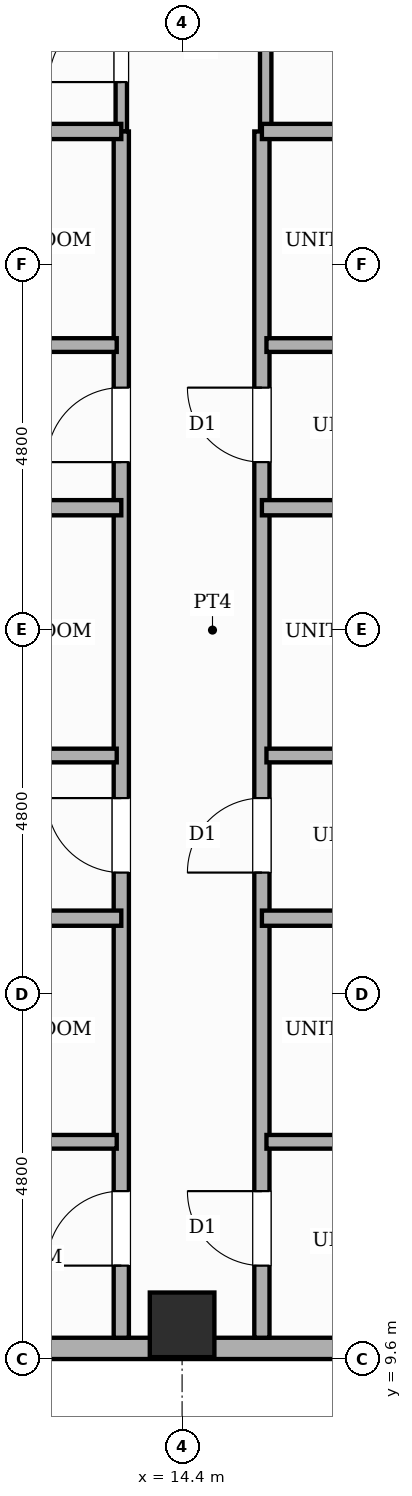
"""IFC4 building model, lengths in metres.
Left out: names, types, materials, properties, quantities, classifications, styles, units other than length and angle.
Written with IfcOpenShell. Run it as: python <this file> out.ifc"""

import sys

from ifc_helpers import new_model, si_unit, direction, frame, frame_2d, origin, origin_2d, place, context, subcontext, project, spatial, rectangle, extrude, element, fill, save


model = new_model("IFC4")
c1 = context("Model", 3, precision=1e-05, world=origin(), true_north=direction((0.0, 1.0)))
c2 = subcontext(c1, "Body", "Model", "MODEL_VIEW")
j1 = project(units=[si_unit("LENGTHUNIT", "METRE"), si_unit("PLANEANGLEUNIT", "RADIAN")], contexts=[c1])
p1 = place(None, origin())
s1 = spatial("IfcSite", under=j1, at=p1, CompositionType="ELEMENT")
p2 = place(p1, origin())
s2 = spatial("IfcBuilding", under=s1, at=p2, CompositionType="ELEMENT")
p3 = place(p2, frame((0.0, 0.0, 211.0)))
s3 = spatial("IfcBuildingStorey", under=s2, at=p3, CompositionType="ELEMENT", Elevation=211.0)
p4 = place(p3, frame((14.4, 10.05, 0.0), z_axis=(0.0, 0.0, 1.0), x_axis=(1.0, 0.0, 0.0)))
e1 = element("IfcColumn", 1, at=p4, inside=s3, PredefinedType="COLUMN", context=c2, shape_type="SweptSolid", body=[
    extrude(rectangle(XDim=0.85, YDim=0.85, at=origin_2d()), origin(), (0.0, 0.0, 1.0), 3.6),
])
p5 = place(p3, frame((21.6, 9.74, 0.0), z_axis=(0.0, 0.0, 1.0), x_axis=(-1.0, 0.0, 0.0)))
e2 = element("IfcWall", 2, at=p5, inside=s3, PredefinedType="STANDARD", context=c2, shape_type="SweptSolid", body=[
    extrude(rectangle(XDim=14.4, YDim=0.28, at=frame_2d((7.2, 0.0))), origin(), (0.0, 0.0, 1.0), 2.66),
])
p6 = place(p5, frame((9.077, 0.0, 0.65)))
e3 = element("IfcOpeningElement", 3, at=p6, cuts=e2, PredefinedType="OPENING", context=c2, shape_type="SweptSolid", body=[
    extrude(rectangle(XDim=1.4, YDim=1.1, at=frame_2d((0.7, 0.55))), frame((0.0, 0.15, 0.0), z_axis=(0.0, -1.0, 0.0), x_axis=(1.0, 0.0, 0.0)), (0.0, 0.0, 1.0), 0.3),
])
p7 = place(p5, frame((0.308, 0.0, 0.65)))
e4 = element("IfcOpeningElement", 4, at=p7, cuts=e2, PredefinedType="OPENING", context=c2, shape_type="SweptSolid", body=[
    extrude(rectangle(XDim=1.4, YDim=1.1, at=frame_2d((0.7, 0.55))), frame((0.0, 0.15, 0.0), z_axis=(0.0, -1.0, 0.0), x_axis=(1.0, 0.0, 0.0)), (0.0, 0.0, 1.0), 0.3),
])
p8 = place(p3, frame((13.6, 25.75, 0.0), z_axis=(0.0, 0.0, 1.0), x_axis=(0.0, 1.0, 0.0)))
e5 = element("IfcWall", 5, at=p8, inside=s3, PredefinedType="PARTITIONING", context=c2, shape_type="SweptSolid", body=[
    extrude(rectangle(XDim=5.15, YDim=0.15, at=frame_2d((2.575, 0.0))), origin(), (0.0, 0.0, 1.0), 3.38),
])
p9 = place(p8, frame((0.65, 0.0, 0.0)))
e6 = element("IfcOpeningElement", 6, at=p9, cuts=e5, PredefinedType="OPENING", context=c2, shape_type="SweptSolid", body=[
    extrude(rectangle(XDim=0.95, YDim=2.15, at=frame_2d((0.475, 1.075))), frame((0.0, 0.085, 0.0), z_axis=(0.0, -1.0, 0.0), x_axis=(1.0, 0.0, 0.0)), (0.0, 0.0, 1.0), 0.17),
])
p10 = place(p8, frame((3.1, 0.0, 0.0)))
e7 = element("IfcOpeningElement", 7, at=p10, cuts=e5, PredefinedType="OPENING", context=c2, shape_type="SweptSolid", body=[
    extrude(rectangle(XDim=0.95, YDim=2.15, at=frame_2d((0.475, 1.075))), frame((0.0, 0.085, 0.0), z_axis=(0.0, -1.0, 0.0), x_axis=(1.0, 0.0, 0.0)), (0.0, 0.0, 1.0), 0.17),
])
p11 = place(p3, frame((15.5, 25.75, 0.0), z_axis=(0.0, 0.0, 1.0), x_axis=(0.0, 1.0, 0.0)))
e8 = element("IfcWall", 8, at=p11, inside=s3, PredefinedType="PARTITIONING", context=c2, shape_type="SweptSolid", body=[
    extrude(rectangle(XDim=5.15, YDim=0.15, at=frame_2d((2.575, 0.0))), origin(), (0.0, 0.0, 1.0), 3.38),
])
p12 = place(p11, frame((1.1, 0.0, 0.0)))
e9 = element("IfcOpeningElement", 9, at=p12, cuts=e8, PredefinedType="OPENING", context=c2, shape_type="SweptSolid", body=[
    extrude(rectangle(XDim=0.95, YDim=2.15, at=frame_2d((0.475, 1.075))), frame((0.0, 0.085, 0.0), z_axis=(0.0, -1.0, 0.0), x_axis=(1.0, 0.0, 0.0)), (0.0, 0.0, 1.0), 0.17),
])
p13 = place(p3, frame((13.6, 9.88, 0.0), z_axis=(0.0, 0.0, 1.0), x_axis=(0.0, 1.0, 0.0)))
e10 = element("IfcWall", 10, at=p13, inside=s3, PredefinedType="PARTITIONING", context=c2, shape_type="SweptSolid", body=[
    extrude(rectangle(XDim=15.87, YDim=0.2, at=frame_2d((7.935, 0.0))), origin(), (0.0, 0.0, 1.0), 3.38),
])
p14 = place(p13, frame((0.949, 0.0, 0.0)))
e11 = element("IfcOpeningElement", 11, at=p14, cuts=e10, PredefinedType="OPENING", context=c2, shape_type="SweptSolid", body=[
    extrude(rectangle(XDim=0.98, YDim=2.18, at=frame_2d((0.49, 1.09))), frame((0.0, 0.11, 0.0), z_axis=(0.0, -1.0, 0.0), x_axis=(1.0, 0.0, 0.0)), (0.0, 0.0, 1.0), 0.22),
])
p15 = place(p13, frame((6.12, 0.0, 0.0)))
e12 = element("IfcOpeningElement", 12, at=p15, cuts=e10, PredefinedType="OPENING", context=c2, shape_type="SweptSolid", body=[
    extrude(rectangle(XDim=0.98, YDim=2.18, at=frame_2d((0.49, 1.09))), frame((0.0, 0.11, 0.0), z_axis=(0.0, -1.0, 0.0), x_axis=(1.0, 0.0, 0.0)), (0.0, 0.0, 1.0), 0.22),
])
p16 = place(p13, frame((11.52, 0.0, 0.0)))
e13 = element("IfcOpeningElement", 13, at=p16, cuts=e10, PredefinedType="OPENING", context=c2, shape_type="SweptSolid", body=[
    extrude(rectangle(XDim=0.98, YDim=2.18, at=frame_2d((0.49, 1.09))), frame((0.0, 0.11, 0.0), z_axis=(0.0, -1.0, 0.0), x_axis=(1.0, 0.0, 0.0)), (0.0, 0.0, 1.0), 0.22),
])
p17 = place(p3, frame((15.45, 9.88, 0.0), z_axis=(0.0, 0.0, 1.0), x_axis=(0.0, 1.0, 0.0)))
e14 = element("IfcWall", 14, at=p17, inside=s3, PredefinedType="PARTITIONING", context=c2, shape_type="SweptSolid", body=[
    extrude(rectangle(XDim=15.87, YDim=0.2, at=frame_2d((7.935, 0.0))), origin(), (0.0, 0.0, 1.0), 3.38),
])
p18 = place(p17, frame((0.949, 0.0, 0.0)))
e15 = element("IfcOpeningElement", 15, at=p18, cuts=e14, PredefinedType="OPENING", context=c2, shape_type="SweptSolid", body=[
    extrude(rectangle(XDim=0.98, YDim=2.18, at=frame_2d((0.49, 1.09))), frame((0.0, 0.11, 0.0), z_axis=(0.0, -1.0, 0.0), x_axis=(1.0, 0.0, 0.0)), (0.0, 0.0, 1.0), 0.22),
])
p19 = place(p17, frame((6.12, 0.0, 0.0)))
e16 = element("IfcOpeningElement", 16, at=p19, cuts=e14, PredefinedType="OPENING", context=c2, shape_type="SweptSolid", body=[
    extrude(rectangle(XDim=0.98, YDim=2.18, at=frame_2d((0.49, 1.09))), frame((0.0, 0.11, 0.0), z_axis=(0.0, -1.0, 0.0), x_axis=(1.0, 0.0, 0.0)), (0.0, 0.0, 1.0), 0.22),
])
p20 = place(p17, frame((11.52, 0.0, 0.0)))
e17 = element("IfcOpeningElement", 17, at=p20, cuts=e14, PredefinedType="OPENING", context=c2, shape_type="SweptSolid", body=[
    extrude(rectangle(XDim=0.98, YDim=2.18, at=frame_2d((0.49, 1.09))), frame((0.0, 0.11, 0.0), z_axis=(0.0, -1.0, 0.0), x_axis=(1.0, 0.0, 0.0)), (0.0, 0.0, 1.0), 0.22),
])
p21 = place(p3, frame((5.08, 25.75, 0.0), z_axis=(0.0, 0.0, 1.0), x_axis=(1.0, 0.0, 0.0)))
e18 = element("IfcWall", 18, at=p21, inside=s3, PredefinedType="PARTITIONING", context=c2, shape_type="SweptSolid", body=[
    extrude(rectangle(XDim=8.52, YDim=0.2, at=frame_2d((4.26, 0.0))), origin(), (0.0, 0.0, 1.0), 3.38),
])
p22 = place(p3, frame((15.45, 25.75, 0.0), z_axis=(0.0, 0.0, 1.0), x_axis=(1.0, 0.0, 0.0)))
e19 = element("IfcWall", 19, at=p22, inside=s3, PredefinedType="PARTITIONING", context=c2, shape_type="SweptSolid", body=[
    extrude(rectangle(XDim=8.27, YDim=0.2, at=frame_2d((4.135, 0.0))), origin(), (0.0, 0.0, 1.0), 3.38),
])
p23 = place(p3, frame((5.08, 12.458, 0.0), z_axis=(0.0, 0.0, 1.0), x_axis=(1.0, 0.0, 0.0)))
e20 = element("IfcWall", 20, at=p23, inside=s3, PredefinedType="PLUMBINGWALL", context=c2, shape_type="SweptSolid", body=[
    extrude(rectangle(XDim=8.46, YDim=0.18, at=frame_2d((4.23, 0.0))), origin(), (0.0, 0.0, 1.0), 3.38),
])
p24 = place(p23, frame((1.56, 0.0, 0.0)))
e21 = element("IfcOpeningElement", 21, at=p24, cuts=e20, PredefinedType="OPENING", context=c2, shape_type="SweptSolid", body=[
    extrude(rectangle(XDim=0.86, YDim=2.1, at=frame_2d((0.43, 1.05))), frame((0.0, 0.1, 0.0), z_axis=(0.0, -1.0, 0.0), x_axis=(1.0, 0.0, 0.0)), (0.0, 0.0, 1.0), 0.2),
])
p25 = place(p23, frame((5.85, 0.0, 0.0)))
e22 = element("IfcOpeningElement", 22, at=p25, cuts=e20, PredefinedType="OPENING", context=c2, shape_type="SweptSolid", body=[
    extrude(rectangle(XDim=0.86, YDim=2.1, at=frame_2d((0.43, 1.05))), frame((0.0, 0.1, 0.0), z_axis=(0.0, -1.0, 0.0), x_axis=(1.0, 0.0, 0.0)), (0.0, 0.0, 1.0), 0.2),
])
p26 = place(p3, frame((5.08, 15.4, 0.0), z_axis=(0.0, 0.0, 1.0), x_axis=(1.0, 0.0, 0.0)))
e23 = element("IfcWall", 23, at=p26, inside=s3, PredefinedType="SOLIDWALL", context=c2, shape_type="SweptSolid", body=[
    extrude(rectangle(XDim=8.52, YDim=0.2, at=frame_2d((4.26, 0.0))), origin(), (0.0, 0.0, 1.0), 3.38),
])
p27 = place(p3, frame((5.08, 17.54, 0.0), z_axis=(0.0, 0.0, 1.0), x_axis=(1.0, 0.0, 0.0)))
e24 = element("IfcWall", 24, at=p27, inside=s3, PredefinedType="PLUMBINGWALL", context=c2, shape_type="SweptSolid", body=[
    extrude(rectangle(XDim=8.46, YDim=0.18, at=frame_2d((4.23, 0.0))), origin(), (0.0, 0.0, 1.0), 3.38),
])
p28 = place(p27, frame((1.56, 0.0, 0.0)))
e25 = element("IfcOpeningElement", 25, at=p28, cuts=e24, PredefinedType="OPENING", context=c2, shape_type="SweptSolid", body=[
    extrude(rectangle(XDim=0.86, YDim=2.1, at=frame_2d((0.43, 1.05))), frame((0.0, 0.1, 0.0), z_axis=(0.0, -1.0, 0.0), x_axis=(1.0, 0.0, 0.0)), (0.0, 0.0, 1.0), 0.2),
])
p29 = place(p27, frame((5.85, 0.0, 0.0)))
e26 = element("IfcOpeningElement", 26, at=p29, cuts=e24, PredefinedType="OPENING", context=c2, shape_type="SweptSolid", body=[
    extrude(rectangle(XDim=0.86, YDim=2.1, at=frame_2d((0.43, 1.05))), frame((0.0, 0.1, 0.0), z_axis=(0.0, -1.0, 0.0), x_axis=(1.0, 0.0, 0.0)), (0.0, 0.0, 1.0), 0.2),
])
p30 = place(p3, frame((5.08, 20.8, 0.0), z_axis=(0.0, 0.0, 1.0), x_axis=(1.0, 0.0, 0.0)))
e27 = element("IfcWall", 27, at=p30, inside=s3, PredefinedType="SOLIDWALL", context=c2, shape_type="SweptSolid", body=[
    extrude(rectangle(XDim=8.52, YDim=0.2, at=frame_2d((4.26, 0.0))), origin(), (0.0, 0.0, 1.0), 3.38),
])
p31 = place(p3, frame((5.08, 22.94, 0.0), z_axis=(0.0, 0.0, 1.0), x_axis=(1.0, 0.0, 0.0)))
e28 = element("IfcWall", 28, at=p31, inside=s3, PredefinedType="PLUMBINGWALL", context=c2, shape_type="SweptSolid", body=[
    extrude(rectangle(XDim=8.46, YDim=0.18, at=frame_2d((4.23, 0.0))), origin(), (0.0, 0.0, 1.0), 3.38),
])
p32 = place(p31, frame((1.56, 0.0, 0.0)))
e29 = element("IfcOpeningElement", 29, at=p32, cuts=e28, PredefinedType="OPENING", context=c2, shape_type="SweptSolid", body=[
    extrude(rectangle(XDim=0.86, YDim=2.1, at=frame_2d((0.43, 1.05))), frame((0.0, 0.1, 0.0), z_axis=(0.0, -1.0, 0.0), x_axis=(1.0, 0.0, 0.0)), (0.0, 0.0, 1.0), 0.2),
])
p33 = place(p31, frame((5.85, 0.0, 0.0)))
e30 = element("IfcOpeningElement", 30, at=p33, cuts=e28, PredefinedType="OPENING", context=c2, shape_type="SweptSolid", body=[
    extrude(rectangle(XDim=0.86, YDim=2.1, at=frame_2d((0.43, 1.05))), frame((0.0, 0.1, 0.0), z_axis=(0.0, -1.0, 0.0), x_axis=(1.0, 0.0, 0.0)), (0.0, 0.0, 1.0), 0.2),
])
p34 = place(p3, frame((15.51, 12.458, 0.0), z_axis=(0.0, 0.0, 1.0), x_axis=(1.0, 0.0, 0.0)))
e31 = element("IfcWall", 31, at=p34, inside=s3, PredefinedType="PLUMBINGWALL", context=c2, shape_type="SweptSolid", body=[
    extrude(rectangle(XDim=8.21, YDim=0.18, at=frame_2d((4.105, 0.0))), origin(), (0.0, 0.0, 1.0), 3.38),
])
p35 = place(p34, frame((1.565, 0.0, 0.0)))
e32 = element("IfcOpeningElement", 32, at=p35, cuts=e31, PredefinedType="OPENING", context=c2, shape_type="SweptSolid", body=[
    extrude(rectangle(XDim=0.86, YDim=2.1, at=frame_2d((0.43, 1.05))), frame((0.0, 0.1, 0.0), z_axis=(0.0, -1.0, 0.0), x_axis=(1.0, 0.0, 0.0)), (0.0, 0.0, 1.0), 0.2),
])
p36 = place(p34, frame((5.73, 0.0, 0.0)))
e33 = element("IfcOpeningElement", 33, at=p36, cuts=e31, PredefinedType="OPENING", context=c2, shape_type="SweptSolid", body=[
    extrude(rectangle(XDim=0.86, YDim=2.1, at=frame_2d((0.43, 1.05))), frame((0.0, 0.1, 0.0), z_axis=(0.0, -1.0, 0.0), x_axis=(1.0, 0.0, 0.0)), (0.0, 0.0, 1.0), 0.2),
])
p37 = place(p3, frame((15.45, 15.4, 0.0), z_axis=(0.0, 0.0, 1.0), x_axis=(1.0, 0.0, 0.0)))
e34 = element("IfcWall", 34, at=p37, inside=s3, PredefinedType="SOLIDWALL", context=c2, shape_type="SweptSolid", body=[
    extrude(rectangle(XDim=8.27, YDim=0.2, at=frame_2d((4.135, 0.0))), origin(), (0.0, 0.0, 1.0), 3.38),
])
p38 = place(p3, frame((15.51, 17.54, 0.0), z_axis=(0.0, 0.0, 1.0), x_axis=(1.0, 0.0, 0.0)))
e35 = element("IfcWall", 35, at=p38, inside=s3, PredefinedType="PLUMBINGWALL", context=c2, shape_type="SweptSolid", body=[
    extrude(rectangle(XDim=8.21, YDim=0.18, at=frame_2d((4.105, 0.0))), origin(), (0.0, 0.0, 1.0), 3.38),
])
p39 = place(p38, frame((1.565, 0.0, 0.0)))
e36 = element("IfcOpeningElement", 36, at=p39, cuts=e35, PredefinedType="OPENING", context=c2, shape_type="SweptSolid", body=[
    extrude(rectangle(XDim=0.86, YDim=2.1, at=frame_2d((0.43, 1.05))), frame((0.0, 0.1, 0.0), z_axis=(0.0, -1.0, 0.0), x_axis=(1.0, 0.0, 0.0)), (0.0, 0.0, 1.0), 0.2),
])
p40 = place(p38, frame((5.73, 0.0, 0.0)))
e37 = element("IfcOpeningElement", 37, at=p40, cuts=e35, PredefinedType="OPENING", context=c2, shape_type="SweptSolid", body=[
    extrude(rectangle(XDim=0.86, YDim=2.1, at=frame_2d((0.43, 1.05))), frame((0.0, 0.1, 0.0), z_axis=(0.0, -1.0, 0.0), x_axis=(1.0, 0.0, 0.0)), (0.0, 0.0, 1.0), 0.2),
])
p41 = place(p3, frame((15.45, 20.8, 0.0), z_axis=(0.0, 0.0, 1.0), x_axis=(1.0, 0.0, 0.0)))
e38 = element("IfcWall", 38, at=p41, inside=s3, PredefinedType="SOLIDWALL", context=c2, shape_type="SweptSolid", body=[
    extrude(rectangle(XDim=8.27, YDim=0.2, at=frame_2d((4.135, 0.0))), origin(), (0.0, 0.0, 1.0), 3.38),
])
p42 = place(p3, frame((15.51, 22.94, 0.0), z_axis=(0.0, 0.0, 1.0), x_axis=(1.0, 0.0, 0.0)))
e39 = element("IfcWall", 39, at=p42, inside=s3, PredefinedType="PLUMBINGWALL", context=c2, shape_type="SweptSolid", body=[
    extrude(rectangle(XDim=8.21, YDim=0.18, at=frame_2d((4.105, 0.0))), origin(), (0.0, 0.0, 1.0), 3.38),
])
p43 = place(p42, frame((1.565, 0.0, 0.0)))
e40 = element("IfcOpeningElement", 40, at=p43, cuts=e39, PredefinedType="OPENING", context=c2, shape_type="SweptSolid", body=[
    extrude(rectangle(XDim=0.86, YDim=2.1, at=frame_2d((0.43, 1.05))), frame((0.0, 0.1, 0.0), z_axis=(0.0, -1.0, 0.0), x_axis=(1.0, 0.0, 0.0)), (0.0, 0.0, 1.0), 0.2),
])
p44 = place(p42, frame((5.73, 0.0, 0.0)))
e41 = element("IfcOpeningElement", 41, at=p44, cuts=e39, PredefinedType="OPENING", context=c2, shape_type="SweptSolid", body=[
    extrude(rectangle(XDim=0.86, YDim=2.1, at=frame_2d((0.43, 1.05))), frame((0.0, 0.1, 0.0), z_axis=(0.0, -1.0, 0.0), x_axis=(1.0, 0.0, 0.0)), (0.0, 0.0, 1.0), 0.2),
])
p45 = place(p9, origin())
e42 = element("IfcDoor", 42, at=p45, inside=s3, OperationType="SINGLE_SWING_LEFT", PredefinedType="DOOR", context=c2, shape_type="SweptSolid", body=[
    extrude(rectangle(XDim=0.95, YDim=2.15, at=frame_2d((0.475, 1.075))), frame((0.0, 0.025, 0.0), z_axis=(0.0, -1.0, 0.0), x_axis=(1.0, 0.0, 0.0)), (0.0, 0.0, 1.0), 0.05),
])
fill(e6, e42)
p46 = place(p14, origin())
e43 = element("IfcDoor", 43, at=p46, inside=s3, OperationType="SINGLE_SWING_LEFT", PredefinedType="DOOR", context=c2, shape_type="SweptSolid", body=[
    extrude(rectangle(XDim=0.98, YDim=2.18, at=frame_2d((0.49, 1.09))), frame((0.0, 0.025, 0.0), z_axis=(0.0, -1.0, 0.0), x_axis=(1.0, 0.0, 0.0)), (0.0, 0.0, 1.0), 0.05),
])
fill(e11, e43)
p47 = place(p15, origin())
e44 = element("IfcDoor", 44, at=p47, inside=s3, OperationType="SINGLE_SWING_RIGHT", PredefinedType="DOOR", context=c2, shape_type="SweptSolid", body=[
    extrude(rectangle(XDim=0.98, YDim=2.18, at=frame_2d((0.49, 1.09))), frame((0.0, 0.025, 0.0), z_axis=(0.0, -1.0, 0.0), x_axis=(1.0, 0.0, 0.0)), (0.0, 0.0, 1.0), 0.05),
])
fill(e12, e44)
p48 = place(p16, origin())
e45 = element("IfcDoor", 45, at=p48, inside=s3, OperationType="SINGLE_SWING_LEFT", PredefinedType="DOOR", context=c2, shape_type="SweptSolid", body=[
    extrude(rectangle(XDim=0.98, YDim=2.18, at=frame_2d((0.49, 1.09))), frame((0.0, 0.025, 0.0), z_axis=(0.0, -1.0, 0.0), x_axis=(1.0, 0.0, 0.0)), (0.0, 0.0, 1.0), 0.05),
])
fill(e13, e45)
p49 = place(p18, origin())
e46 = element("IfcDoor", 46, at=p49, inside=s3, OperationType="SINGLE_SWING_RIGHT", PredefinedType="DOOR", context=c2, shape_type="SweptSolid", body=[
    extrude(rectangle(XDim=0.98, YDim=2.18, at=frame_2d((0.49, 1.09))), frame((0.0, 0.025, 0.0), z_axis=(0.0, -1.0, 0.0), x_axis=(1.0, 0.0, 0.0)), (0.0, 0.0, 1.0), 0.05),
])
fill(e15, e46)
p50 = place(p19, origin())
e47 = element("IfcDoor", 47, at=p50, inside=s3, OperationType="SINGLE_SWING_LEFT", PredefinedType="DOOR", context=c2, shape_type="SweptSolid", body=[
    extrude(rectangle(XDim=0.98, YDim=2.18, at=frame_2d((0.49, 1.09))), frame((0.0, 0.025, 0.0), z_axis=(0.0, -1.0, 0.0), x_axis=(1.0, 0.0, 0.0)), (0.0, 0.0, 1.0), 0.05),
])
fill(e16, e47)
p51 = place(p20, origin())
e48 = element("IfcDoor", 48, at=p51, inside=s3, OperationType="SINGLE_SWING_RIGHT", PredefinedType="DOOR", context=c2, shape_type="SweptSolid", body=[
    extrude(rectangle(XDim=0.98, YDim=2.18, at=frame_2d((0.49, 1.09))), frame((0.0, 0.025, 0.0), z_axis=(0.0, -1.0, 0.0), x_axis=(1.0, 0.0, 0.0)), (0.0, 0.0, 1.0), 0.05),
])
fill(e17, e48)
save(model, sys.argv[1])
